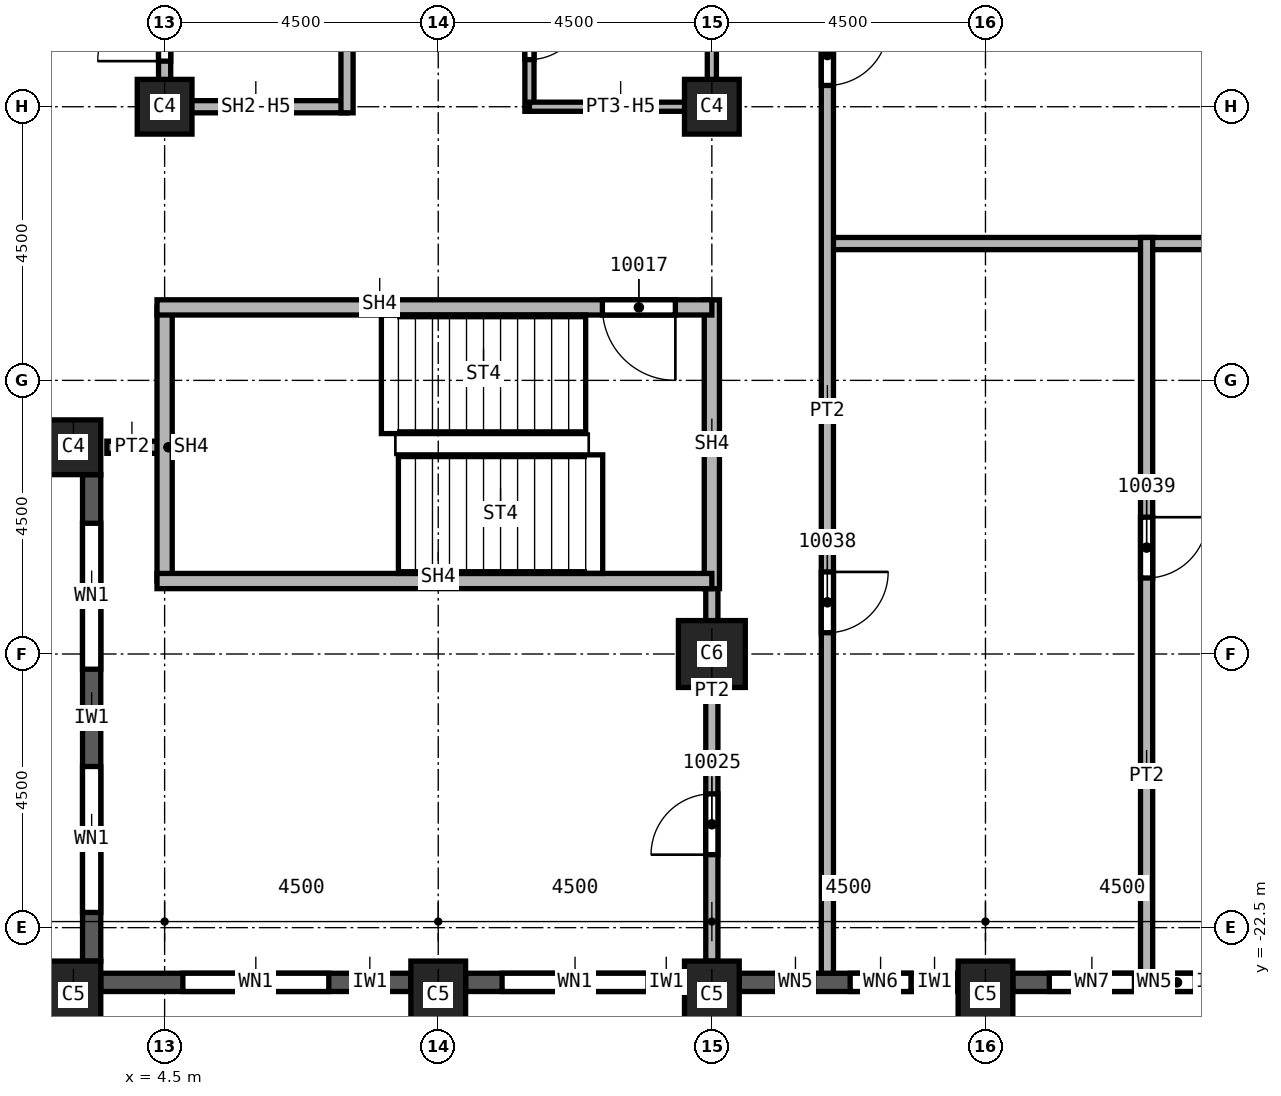
"""IFC4 building model, lengths in metres.
Left out: names, types, materials, properties, quantities, classifications, styles, units other than length and angle.
Written with IfcOpenShell. Run it as: python <this file> out.ifc"""

import sys

from ifc_helpers import new_model, si_unit, direction, frame, frame_2d, origin, origin_2d, place, context, subcontext, project, spatial, rectangle, extrude, element, fill, save


model = new_model("IFC4")
c1 = context("Model", 3, precision=1e-05, world=origin(), true_north=direction((0.0, 1.0)))
c2 = subcontext(c1, "Body", "Model", "MODEL_VIEW")
j1 = project(units=[si_unit("LENGTHUNIT", "METRE"), si_unit("PLANEANGLEUNIT", "RADIAN")], contexts=[c1])
p1 = place(None, origin())
s1 = spatial("IfcSite", under=j1, at=p1, CompositionType="ELEMENT")
p2 = place(p1, origin())
s2 = spatial("IfcBuilding", under=s1, at=p2, CompositionType="ELEMENT")
p3 = place(p2, frame((0.0, 0.0, 170.0)))
s3 = spatial("IfcBuildingStorey", under=s2, at=p3, CompositionType="ELEMENT", Elevation=170.0)
p4 = place(p3, frame((13.5, -18.0, 0.0), z_axis=(0.0, 0.0, 1.0), x_axis=(1.0, 0.0, 0.0)))
e1 = element("IfcColumn", 1, at=p4, inside=s3, PredefinedType="COLUMN", context=c2, shape_type="SweptSolid", body=[
    extrude(rectangle(XDim=1.1, YDim=1.1, at=origin_2d()), origin(), (0.0, 0.0, 1.0), 3.7),
])
for number, where, z_axis, x_axis in (
    (2, (4.5, -9.0, 0.0), (0.0, 0.0, 1.0), (1.0, 0.0, 0.0)),
    (3, (13.5, -9.0, 0.0), (0.0, 0.0, 1.0), (1.0, 0.0, 0.0)),
):
    element("IfcColumn", number, at=place(p3, frame(where, z_axis=z_axis, x_axis=x_axis)), inside=s3, PredefinedType="COLUMN", context=c2, shape_type="SweptSolid", body=[
        extrude(rectangle(XDim=0.9, YDim=0.9, at=origin_2d()), origin(), (0.0, 0.0, 1.0), 3.7),
    ])
for number, where, z_axis, x_axis in (
    (4, (3.0, -23.6, 0.0), (0.0, 0.0, 1.0), (1.0, 0.0, 0.0)),
    (5, (9.0, -23.6, 0.0), (0.0, 0.0, 1.0), (1.0, 0.0, 0.0)),
    (6, (13.5, -23.6, 0.0), (0.0, 0.0, 1.0), (1.0, 0.0, 0.0)),
    (7, (18.0, -23.6, 0.0), (0.0, 0.0, 1.0), (1.0, 0.0, 0.0)),
):
    element("IfcColumn", number, at=place(p3, frame(where, z_axis=z_axis, x_axis=x_axis)), inside=s3, PredefinedType="COLUMN", context=c2, shape_type="SweptSolid", body=[
        extrude(rectangle(XDim=0.9, YDim=1.1, at=origin_2d()), origin(), (0.0, 0.0, 1.0), 3.7),
    ])
p5 = place(p3, frame((3.0, -14.6, 0.0), z_axis=(0.0, 0.0, 1.0), x_axis=(1.0, 0.0, 0.0)))
e8 = element("IfcColumn", 8, at=p5, inside=s3, PredefinedType="COLUMN", context=c2, shape_type="SweptSolid", body=[
    extrude(rectangle(XDim=0.9, YDim=0.9, at=origin_2d()), origin(), (0.0, 0.0, 1.0), 3.7),
])
p6 = place(p3, frame((3.3, -15.05, 0.0), z_axis=(0.0, 0.0, 1.0), x_axis=(0.0, -1.0, 0.0)))
e9 = element("IfcWall", 9, at=p6, inside=s3, PredefinedType="SOLIDWALL", context=c2, shape_type="SweptSolid", body=[
    extrude(rectangle(XDim=8.0, YDim=0.3, at=frame_2d((4.0, 0.0))), origin(), (0.0, 0.0, 1.0), 3.1),
])
p7 = place(p6, frame((0.8, 0.0, 0.8)))
e10 = element("IfcOpeningElement", 10, at=p7, cuts=e9, PredefinedType="OPENING", context=c2, shape_type="SweptSolid", body=[
    extrude(rectangle(XDim=2.4, YDim=1.95, at=frame_2d((1.2, 0.975))), frame((0.0, 0.15, 0.0), z_axis=(0.0, -1.0, 0.0), x_axis=(1.0, 0.0, 0.0)), (0.0, 0.0, 1.0), 0.3),
])
p8 = place(p6, frame((4.8, 0.0, 0.8)))
e11 = element("IfcOpeningElement", 11, at=p8, cuts=e9, PredefinedType="OPENING", context=c2, shape_type="SweptSolid", body=[
    extrude(rectangle(XDim=2.4, YDim=1.95, at=frame_2d((1.2, 0.975))), frame((0.0, 0.15, 0.0), z_axis=(0.0, -1.0, 0.0), x_axis=(1.0, 0.0, 0.0)), (0.0, 0.0, 1.0), 0.3),
])
p9 = place(p3, frame((3.45, -23.4, 0.0), z_axis=(0.0, 0.0, 1.0), x_axis=(1.0, 0.0, 0.0)))
e12 = element("IfcWall", 12, at=p9, inside=s3, PredefinedType="SOLIDWALL", context=c2, shape_type="SweptSolid", body=[
    extrude(rectangle(XDim=5.1, YDim=0.3, at=frame_2d((2.55, 0.0))), origin(), (0.0, 0.0, 1.0), 3.1),
])
p10 = place(p9, frame((1.35, 0.0, 0.8)))
e13 = element("IfcOpeningElement", 13, at=p10, cuts=e12, PredefinedType="OPENING", context=c2, shape_type="SweptSolid", body=[
    extrude(rectangle(XDim=2.4, YDim=1.95, at=frame_2d((1.2, 0.975))), frame((0.0, 0.15, 0.0), z_axis=(0.0, -1.0, 0.0), x_axis=(1.0, 0.0, 0.0)), (0.0, 0.0, 1.0), 0.3),
])
p11 = place(p3, frame((9.45, -23.4, 0.0), z_axis=(0.0, 0.0, 1.0), x_axis=(1.0, 0.0, 0.0)))
e14 = element("IfcWall", 14, at=p11, inside=s3, PredefinedType="SOLIDWALL", context=c2, shape_type="SweptSolid", body=[
    extrude(rectangle(XDim=3.6, YDim=0.3, at=frame_2d((1.8, 0.0))), origin(), (0.0, 0.0, 1.0), 3.1),
])
p12 = place(p11, frame((0.6, 0.0, 0.8)))
e15 = element("IfcOpeningElement", 15, at=p12, cuts=e14, PredefinedType="OPENING", context=c2, shape_type="SweptSolid", body=[
    extrude(rectangle(XDim=2.4, YDim=1.95, at=frame_2d((1.2, 0.975))), frame((0.0, 0.15, 0.0), z_axis=(0.0, -1.0, 0.0), x_axis=(1.0, 0.0, 0.0)), (0.0, 0.0, 1.0), 0.3),
])
p13 = place(p3, frame((13.95, -23.4, 0.0), z_axis=(0.0, 0.0, 1.0), x_axis=(1.0, 0.0, 0.0)))
e16 = element("IfcWall", 16, at=p13, inside=s3, PredefinedType="SOLIDWALL", context=c2, shape_type="SweptSolid", body=[
    extrude(rectangle(XDim=3.6, YDim=0.3, at=frame_2d((1.8, 0.0))), origin(), (0.0, 0.0, 1.0), 3.1),
])
p14 = place(p13, frame((0.625, 0.0, 0.8)))
e17 = element("IfcOpeningElement", 17, at=p14, cuts=e16, PredefinedType="OPENING", context=c2, shape_type="SweptSolid", body=[
    extrude(rectangle(XDim=0.6, YDim=1.95, at=frame_2d((0.3, 0.975))), frame((0.0, 0.15, 0.0), z_axis=(0.0, -1.0, 0.0), x_axis=(1.0, 0.0, 0.0)), (0.0, 0.0, 1.0), 0.3),
])
p15 = place(p13, frame((1.825, 0.0, 0.8)))
e18 = element("IfcOpeningElement", 18, at=p15, cuts=e16, PredefinedType="OPENING", context=c2, shape_type="SweptSolid", body=[
    extrude(rectangle(XDim=1.0, YDim=1.95, at=frame_2d((0.5, 0.975))), frame((0.0, 0.15, 0.0), z_axis=(0.0, -1.0, 0.0), x_axis=(1.0, 0.0, 0.0)), (0.0, 0.0, 1.0), 0.3),
])
p16 = place(p3, frame((18.45, -23.4, 0.0), z_axis=(0.0, 0.0, 1.0), x_axis=(1.0, 0.0, 0.0)))
e19 = element("IfcWall", 19, at=p16, inside=s3, PredefinedType="SOLIDWALL", context=c2, shape_type="SweptSolid", body=[
    extrude(rectangle(XDim=3.6, YDim=0.3, at=frame_2d((1.8, 0.0))), origin(), (0.0, 0.0, 1.0), 3.1),
])
p17 = place(p16, frame((0.6, 0.0, 0.8)))
e20 = element("IfcOpeningElement", 20, at=p17, cuts=e19, PredefinedType="OPENING", context=c2, shape_type="SweptSolid", body=[
    extrude(rectangle(XDim=1.4, YDim=1.95, at=frame_2d((0.7, 0.975))), frame((0.0, 0.15, 0.0), z_axis=(0.0, -1.0, 0.0), x_axis=(1.0, 0.0, 0.0)), (0.0, 0.0, 1.0), 0.3),
])
p18 = place(p16, frame((2.4, 0.0, 0.8)))
e21 = element("IfcOpeningElement", 21, at=p18, cuts=e19, PredefinedType="OPENING", context=c2, shape_type="SweptSolid", body=[
    extrude(rectangle(XDim=0.6, YDim=1.95, at=frame_2d((0.3, 0.975))), frame((0.0, 0.15, 0.0), z_axis=(0.0, -1.0, 0.0), x_axis=(1.0, 0.0, 0.0)), (0.0, 0.0, 1.0), 0.3),
])
p19 = place(p3, frame((4.5, -14.6, 0.0), z_axis=(0.0, 0.0, 1.0), x_axis=(-1.0, 0.0, 0.0)))
e22 = element("IfcWall", 22, at=p19, inside=s3, PredefinedType="PARTITIONING", context=c2, shape_type="SweptSolid", body=[
    extrude(rectangle(XDim=0.95, YDim=0.2, at=frame_2d((0.475, 0.0))), origin(), (0.0, 0.0, 1.0), 3.7),
])
p20 = place(p3, frame((13.5, -23.05, 0.0), z_axis=(0.0, 0.0, 1.0), x_axis=(0.0, 1.0, 0.0)))
e23 = element("IfcWall", 23, at=p20, inside=s3, PredefinedType="PARTITIONING", context=c2, shape_type="SweptSolid", body=[
    extrude(rectangle(XDim=6.375, YDim=0.2, at=frame_2d((3.188, 0.0))), origin(), (0.0, 0.0, 1.0), 3.7),
])
p21 = place(p20, frame((1.75, 0.0, 0.0)))
e24 = element("IfcOpeningElement", 24, at=p21, cuts=e23, PredefinedType="OPENING", context=c2, shape_type="SweptSolid", body=[
    extrude(rectangle(XDim=1.0, YDim=2.1, at=frame_2d((0.5, 1.05))), frame((0.0, 0.1, 0.0), z_axis=(0.0, -1.0, 0.0), x_axis=(1.0, 0.0, 0.0)), (0.0, 0.0, 1.0), 0.2),
])
p22 = place(p3, frame((15.4, -11.25, 0.0), z_axis=(0.0, 0.0, 1.0), x_axis=(1.0, 0.0, 0.0)))
e25 = element("IfcWall", 25, at=p22, inside=s3, PredefinedType="PARTITIONING", context=c2, shape_type="SweptSolid", body=[
    extrude(rectangle(XDim=11.7, YDim=0.2, at=frame_2d((5.85, 0.0))), origin(), (0.0, 0.0, 1.0), 3.7),
])
p23 = place(p3, frame((15.4, -3.65, 0.0), z_axis=(0.0, 0.0, 1.0), x_axis=(0.0, -1.0, 0.0)))
e26 = element("IfcWall", 26, at=p23, inside=s3, PredefinedType="PARTITIONING", context=c2, shape_type="SweptSolid", body=[
    extrude(rectangle(XDim=19.6, YDim=0.2, at=frame_2d((9.8, 0.0))), origin(), (0.0, 0.0, 1.0), 3.7),
])
p24 = place(p23, frame((13.0, 0.0, 0.0)))
e27 = element("IfcOpeningElement", 27, at=p24, cuts=e26, PredefinedType="OPENING", context=c2, shape_type="SweptSolid", body=[
    extrude(rectangle(XDim=1.0, YDim=2.1, at=frame_2d((0.5, 1.05))), frame((0.0, 0.1, 0.0), z_axis=(0.0, -1.0, 0.0), x_axis=(1.0, 0.0, 0.0)), (0.0, 0.0, 1.0), 0.2),
])
p25 = place(p23, frame((4.0, 0.0, 0.0)))
e28 = element("IfcOpeningElement", 28, at=p25, cuts=e26, PredefinedType="OPENING", context=c2, shape_type="SweptSolid", body=[
    extrude(rectangle(XDim=1.0, YDim=2.1, at=frame_2d((0.5, 1.05))), frame((0.0, 0.1, 0.0), z_axis=(0.0, -1.0, 0.0), x_axis=(1.0, 0.0, 0.0)), (0.0, 0.0, 1.0), 0.2),
])
p26 = place(p3, frame((20.65, -11.15, 0.0), z_axis=(0.0, 0.0, 1.0), x_axis=(0.0, -1.0, 0.0)))
e29 = element("IfcWall", 29, at=p26, inside=s3, PredefinedType="PARTITIONING", context=c2, shape_type="SweptSolid", body=[
    extrude(rectangle(XDim=12.1, YDim=0.2, at=frame_2d((6.05, 0.0))), origin(), (0.0, 0.0, 1.0), 3.7),
])
p27 = place(p26, frame((4.6, 0.0, 0.0)))
e30 = element("IfcOpeningElement", 30, at=p27, cuts=e29, PredefinedType="OPENING", context=c2, shape_type="SweptSolid", body=[
    extrude(rectangle(XDim=1.0, YDim=2.1, at=frame_2d((0.5, 1.05))), frame((0.0, 0.1, 0.0), z_axis=(0.0, -1.0, 0.0), x_axis=(1.0, 0.0, 0.0)), (0.0, 0.0, 1.0), 0.2),
])
p28 = place(p3, frame((4.5, -9.1, 0.0), z_axis=(0.0, 0.0, 1.0), x_axis=(0.0, 1.0, 0.0)))
e31 = element("IfcWall", 31, at=p28, inside=s3, PredefinedType="SOLIDWALL", context=c2, shape_type="SweptSolid", body=[
    extrude(rectangle(XDim=9.1, YDim=0.2, at=frame_2d((4.55, 0.0))), origin(), (0.0, 0.0, 1.0), 2.938),
])
p29 = place(p28, frame((0.85, 0.0, 0.0)))
e32 = element("IfcOpeningElement", 32, at=p29, cuts=e31, PredefinedType="OPENING", context=c2, shape_type="SweptSolid", body=[
    extrude(rectangle(XDim=1.1, YDim=2.1, at=frame_2d((0.55, 1.05))), frame((0.0, 0.1, 0.0), z_axis=(0.0, -1.0, 0.0), x_axis=(1.0, 0.0, 0.0)), (0.0, 0.0, 1.0), 0.2),
])
p30 = place(p28, frame((6.35, 0.0, 0.0)))
e33 = element("IfcOpeningElement", 33, at=p30, cuts=e31, PredefinedType="OPENING", context=c2, shape_type="SweptSolid", body=[
    extrude(rectangle(XDim=1.1, YDim=2.1, at=frame_2d((0.55, 1.05))), frame((0.0, 0.1, 0.0), z_axis=(0.0, -1.0, 0.0), x_axis=(1.0, 0.0, 0.0)), (0.0, 0.0, 1.0), 0.2),
])
p31 = place(p3, frame((7.5, -9.0, 0.0), z_axis=(0.0, 0.0, 1.0), x_axis=(-1.0, 0.0, 0.0)))
e34 = element("IfcWall", 34, at=p31, inside=s3, PredefinedType="SOLIDWALL", context=c2, shape_type="SweptSolid", body=[
    extrude(rectangle(XDim=3.0, YDim=0.2, at=frame_2d((1.5, 0.0))), origin(), (0.0, 0.0, 1.0), 2.938),
])
p32 = place(p3, frame((7.5, -2.875, 0.0), z_axis=(0.0, 0.0, 1.0), x_axis=(0.0, -1.0, 0.0)))
e35 = element("IfcWall", 35, at=p32, inside=s3, PredefinedType="SOLIDWALL", context=c2, shape_type="SweptSolid", body=[
    extrude(rectangle(XDim=6.225, YDim=0.2, at=frame_2d((3.113, 0.0))), origin(), (0.0, 0.0, 1.0), 3.7),
])
p33 = place(p3, frame((4.5, -16.8, 0.0), z_axis=(0.0, 0.0, 1.0), x_axis=(0.0, 1.0, 0.0)))
e36 = element("IfcWall", 36, at=p33, inside=s3, PredefinedType="SOLIDWALL", context=c2, shape_type="SweptSolid", body=[
    extrude(rectangle(XDim=4.5, YDim=0.25, at=frame_2d((2.25, 0.0))), origin(), (0.0, 0.0, 1.0), 3.7),
])
p34 = place(p3, frame((13.5, -16.925, 0.0), z_axis=(0.0, 0.0, 1.0), x_axis=(0.0, 1.0, 0.0)))
e37 = element("IfcWall", 37, at=p34, inside=s3, PredefinedType="SOLIDWALL", context=c2, shape_type="SweptSolid", body=[
    extrude(rectangle(XDim=4.75, YDim=0.25, at=frame_2d((2.375, 0.0))), origin(), (0.0, 0.0, 1.0), 3.7),
])
p35 = place(p3, frame((13.5, -16.8, 0.0), z_axis=(0.0, 0.0, 1.0), x_axis=(-1.0, 0.0, 0.0)))
e38 = element("IfcWall", 38, at=p35, inside=s3, PredefinedType="SOLIDWALL", context=c2, shape_type="SweptSolid", body=[
    extrude(rectangle(XDim=9.125, YDim=0.25, at=frame_2d((4.562, 0.0))), origin(), (0.0, 0.0, 1.0), 3.7),
])
p36 = place(p3, frame((13.5, -12.3, 0.0), z_axis=(0.0, 0.0, 1.0), x_axis=(-1.0, 0.0, 0.0)))
e39 = element("IfcWall", 39, at=p36, inside=s3, PredefinedType="SOLIDWALL", context=c2, shape_type="SweptSolid", body=[
    extrude(rectangle(XDim=9.125, YDim=0.25, at=frame_2d((4.562, 0.0))), origin(), (0.0, 0.0, 1.0), 3.7),
])
p37 = place(p36, frame((0.6, 0.0, 0.0)))
e40 = element("IfcOpeningElement", 40, at=p37, cuts=e39, PredefinedType="OPENING", context=c2, shape_type="SweptSolid", body=[
    extrude(rectangle(XDim=1.2, YDim=2.1, at=frame_2d((0.6, 1.05))), frame((0.0, 0.125, 0.0), z_axis=(0.0, -1.0, 0.0), x_axis=(1.0, 0.0, 0.0)), (0.0, 0.0, 1.0), 0.25),
])
p38 = place(p3, frame((10.5, -2.875, 0.0), z_axis=(0.0, 0.0, 1.0), x_axis=(0.0, -1.0, 0.0)))
e41 = element("IfcWall", 41, at=p38, inside=s3, PredefinedType="PARTITIONING", context=c2, shape_type="SweptSolid", body=[
    extrude(rectangle(XDim=6.2, YDim=0.15, at=frame_2d((3.1, 0.0))), origin(), (0.0, 0.0, 1.0), 3.7),
])
p39 = place(p38, frame((4.45, 0.0, 0.0)))
e42 = element("IfcOpeningElement", 42, at=p39, cuts=e41, PredefinedType="OPENING", context=c2, shape_type="SweptSolid", body=[
    extrude(rectangle(XDim=0.9, YDim=2.1, at=frame_2d((0.45, 1.05))), frame((0.0, 0.075, 0.0), z_axis=(0.0, -1.0, 0.0), x_axis=(1.0, 0.0, 0.0)), (0.0, 0.0, 1.0), 0.15),
])
p40 = place(p3, frame((13.5, -9.0, 0.0), z_axis=(0.0, 0.0, 1.0), x_axis=(-1.0, 0.0, 0.0)))
e43 = element("IfcWall", 43, at=p40, inside=s3, PredefinedType="PARTITIONING", context=c2, shape_type="SweptSolid", body=[
    extrude(rectangle(XDim=3.0, YDim=0.15, at=frame_2d((1.5, 0.0))), origin(), (0.0, 0.0, 1.0), 2.938),
])
p41 = place(p3, frame((13.5, -3.0, 0.0), z_axis=(0.0, 0.0, 1.0), x_axis=(0.0, -1.0, 0.0)))
e44 = element("IfcWall", 44, at=p41, inside=s3, PredefinedType="PARTITIONING", context=c2, shape_type="SweptSolid", body=[
    extrude(rectangle(XDim=6.075, YDim=0.15, at=frame_2d((3.038, 0.0))), origin(), (0.0, 0.0, 1.0), 2.938),
])
p42 = place(p7, origin())
e45 = element("IfcWindow", 45, at=p42, inside=s3, PartitioningType="SINGLE_PANEL", PredefinedType="WINDOW", context=c2, shape_type="SweptSolid", body=[
    extrude(rectangle(XDim=2.4, YDim=1.95, at=frame_2d((1.2, 0.975))), frame((0.0, 0.03, 0.0), z_axis=(0.0, -1.0, 0.0), x_axis=(1.0, 0.0, 0.0)), (0.0, 0.0, 1.0), 0.06),
])
fill(e10, e45)
p43 = place(p8, origin())
e46 = element("IfcWindow", 46, at=p43, inside=s3, PartitioningType="SINGLE_PANEL", PredefinedType="WINDOW", context=c2, shape_type="SweptSolid", body=[
    extrude(rectangle(XDim=2.4, YDim=1.95, at=frame_2d((1.2, 0.975))), frame((0.0, 0.03, 0.0), z_axis=(0.0, -1.0, 0.0), x_axis=(1.0, 0.0, 0.0)), (0.0, 0.0, 1.0), 0.06),
])
fill(e11, e46)
p44 = place(p10, origin())
e47 = element("IfcWindow", 47, at=p44, inside=s3, PartitioningType="SINGLE_PANEL", PredefinedType="WINDOW", context=c2, shape_type="SweptSolid", body=[
    extrude(rectangle(XDim=2.4, YDim=1.95, at=frame_2d((1.2, 0.975))), frame((0.0, 0.03, 0.0), z_axis=(0.0, -1.0, 0.0), x_axis=(1.0, 0.0, 0.0)), (0.0, 0.0, 1.0), 0.06),
])
fill(e13, e47)
p45 = place(p12, origin())
e48 = element("IfcWindow", 48, at=p45, inside=s3, PartitioningType="SINGLE_PANEL", PredefinedType="WINDOW", context=c2, shape_type="SweptSolid", body=[
    extrude(rectangle(XDim=2.4, YDim=1.95, at=frame_2d((1.2, 0.975))), frame((0.0, 0.03, 0.0), z_axis=(0.0, -1.0, 0.0), x_axis=(1.0, 0.0, 0.0)), (0.0, 0.0, 1.0), 0.06),
])
fill(e15, e48)
p46 = place(p29, origin())
e49 = element("IfcDoor", 49, at=p46, inside=s3, OperationType="SINGLE_SWING_LEFT", PredefinedType="DOOR", context=c2, shape_type="SweptSolid", body=[
    extrude(rectangle(XDim=1.1, YDim=2.1, at=frame_2d((0.55, 1.05))), frame((0.0, 0.025, 0.0), z_axis=(0.0, -1.0, 0.0), x_axis=(1.0, 0.0, 0.0)), (0.0, 0.0, 1.0), 0.05),
])
fill(e32, e49)
p47 = place(p39, origin())
e50 = element("IfcDoor", 50, at=p47, inside=s3, OperationType="SINGLE_SWING_LEFT", PredefinedType="DOOR", context=c2, shape_type="SweptSolid", body=[
    extrude(rectangle(XDim=0.9, YDim=2.1, at=frame_2d((0.45, 1.05))), frame((0.0, 0.025, 0.0), z_axis=(0.0, -1.0, 0.0), x_axis=(1.0, 0.0, 0.0)), (0.0, 0.0, 1.0), 0.05),
])
fill(e42, e50)
p48 = place(p37, origin())
e51 = element("IfcDoor", 51, at=p48, inside=s3, OperationType="SINGLE_SWING_RIGHT", PredefinedType="DOOR", context=c2, shape_type="SweptSolid", body=[
    extrude(rectangle(XDim=1.2, YDim=2.1, at=frame_2d((0.6, 1.05))), frame((0.0, 0.025, 0.0), z_axis=(0.0, -1.0, 0.0), x_axis=(1.0, 0.0, 0.0)), (0.0, 0.0, 1.0), 0.05),
])
fill(e40, e51)
p49 = place(p21, origin())
e52 = element("IfcDoor", 52, at=p49, inside=s3, OperationType="SINGLE_SWING_RIGHT", PredefinedType="DOOR", context=c2, shape_type="SweptSolid", body=[
    extrude(rectangle(XDim=1.0, YDim=2.1, at=frame_2d((0.5, 1.05))), frame((0.0, 0.025, 0.0), z_axis=(0.0, -1.0, 0.0), x_axis=(1.0, 0.0, 0.0)), (0.0, 0.0, 1.0), 0.05),
])
fill(e24, e52)
p50 = place(p24, origin())
e53 = element("IfcDoor", 53, at=p50, inside=s3, OperationType="SINGLE_SWING_LEFT", PredefinedType="DOOR", context=c2, shape_type="SweptSolid", body=[
    extrude(rectangle(XDim=1.0, YDim=2.1, at=frame_2d((0.5, 1.05))), frame((0.0, 0.025, 0.0), z_axis=(0.0, -1.0, 0.0), x_axis=(1.0, 0.0, 0.0)), (0.0, 0.0, 1.0), 0.05),
])
fill(e27, e53)
p51 = place(p27, origin())
e54 = element("IfcDoor", 54, at=p51, inside=s3, OperationType="SINGLE_SWING_RIGHT", PredefinedType="DOOR", context=c2, shape_type="SweptSolid", body=[
    extrude(rectangle(XDim=1.0, YDim=2.1, at=frame_2d((0.5, 1.05))), frame((0.0, 0.025, 0.0), z_axis=(0.0, -1.0, 0.0), x_axis=(1.0, 0.0, 0.0)), (0.0, 0.0, 1.0), 0.05),
])
fill(e30, e54)
p52 = place(p25, origin())
e55 = element("IfcDoor", 55, at=p52, inside=s3, OperationType="SINGLE_SWING_LEFT", PredefinedType="DOOR", context=c2, shape_type="SweptSolid", body=[
    extrude(rectangle(XDim=1.0, YDim=2.1, at=frame_2d((0.5, 1.05))), frame((0.0, 0.025, 0.0), z_axis=(0.0, -1.0, 0.0), x_axis=(1.0, 0.0, 0.0)), (0.0, 0.0, 1.0), 0.05),
])
fill(e28, e55)
p53 = place(p14, origin())
e56 = element("IfcWindow", 56, at=p53, inside=s3, PartitioningType="SINGLE_PANEL", PredefinedType="WINDOW", context=c2, shape_type="SweptSolid", body=[
    extrude(rectangle(XDim=0.6, YDim=1.95, at=frame_2d((0.3, 0.975))), frame((0.0, 0.03, 0.0), z_axis=(0.0, -1.0, 0.0), x_axis=(1.0, 0.0, 0.0)), (0.0, 0.0, 1.0), 0.06),
])
fill(e17, e56)
p54 = place(p15, origin())
e57 = element("IfcWindow", 57, at=p54, inside=s3, PartitioningType="SINGLE_PANEL", PredefinedType="WINDOW", context=c2, shape_type="SweptSolid", body=[
    extrude(rectangle(XDim=1.0, YDim=1.95, at=frame_2d((0.5, 0.975))), frame((0.0, 0.03, 0.0), z_axis=(0.0, -1.0, 0.0), x_axis=(1.0, 0.0, 0.0)), (0.0, 0.0, 1.0), 0.06),
])
fill(e18, e57)
p55 = place(p17, origin())
e58 = element("IfcWindow", 58, at=p55, inside=s3, PartitioningType="SINGLE_PANEL", PredefinedType="WINDOW", context=c2, shape_type="SweptSolid", body=[
    extrude(rectangle(XDim=1.4, YDim=1.95, at=frame_2d((0.7, 0.975))), frame((0.0, 0.03, 0.0), z_axis=(0.0, -1.0, 0.0), x_axis=(1.0, 0.0, 0.0)), (0.0, 0.0, 1.0), 0.06),
])
fill(e20, e58)
p56 = place(p18, origin())
e59 = element("IfcWindow", 59, at=p56, inside=s3, PartitioningType="SINGLE_PANEL", PredefinedType="WINDOW", context=c2, shape_type="SweptSolid", body=[
    extrude(rectangle(XDim=0.6, YDim=1.95, at=frame_2d((0.3, 0.975))), frame((0.0, 0.03, 0.0), z_axis=(0.0, -1.0, 0.0), x_axis=(1.0, 0.0, 0.0)), (0.0, 0.0, 1.0), 0.06),
])
fill(e21, e59)
save(model, sys.argv[1])
